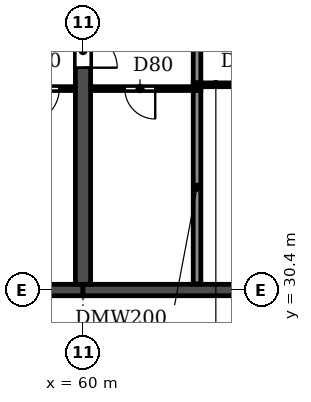
"""IFC4 building model, lengths in metres.
Left out: names, types, materials, properties, quantities, classifications, styles, units other than length and angle.
Written with IfcOpenShell. Run it as: python <this file> out.ifc"""

import sys

from ifc_helpers import new_model, si_unit, direction, frame, frame_2d, origin, place, context, subcontext, project, spatial, rectangle, extrude, element, fill, save


model = new_model("IFC4")
c1 = context("Model", 3, precision=1e-05, world=origin(), true_north=direction((0.0, 1.0)))
c2 = subcontext(c1, "Body", "Model", "MODEL_VIEW")
j1 = project(units=[si_unit("LENGTHUNIT", "METRE"), si_unit("PLANEANGLEUNIT", "RADIAN")], contexts=[c1])
p1 = place(None, origin())
s1 = spatial("IfcSite", under=j1, at=p1, CompositionType="ELEMENT")
p2 = place(p1, origin())
s2 = spatial("IfcBuilding", under=s1, at=p2, CompositionType="ELEMENT")
p3 = place(p2, frame((0.0, 0.0, 49.8)))
s3 = spatial("IfcBuildingStorey", under=s2, at=p3, CompositionType="ELEMENT", Elevation=49.8)
p4 = place(p3, frame((60.0, 30.55, 0.0), z_axis=(0.0, 0.0, 1.0), x_axis=(0.0, 1.0, 0.0)))
e1 = element("IfcWall", 1, at=p4, inside=s3, PredefinedType="SHEAR", context=c2, shape_type="SweptSolid", body=[
    extrude(rectangle(XDim=14.05, YDim=0.4, at=frame_2d((7.025, 0.0))), origin(), (0.0, 0.0, 1.0), 3.0),
])
p5 = place(p4, frame((5.7, 0.0, 0.0)))
e2 = element("IfcOpeningElement", 2, at=p5, cuts=e1, PredefinedType="OPENING", context=c2, shape_type="SweptSolid", body=[
    extrude(rectangle(XDim=0.9, YDim=2.1, at=frame_2d((0.45, 1.05))), frame((0.0, 0.21, 0.0), z_axis=(0.0, -1.0, 0.0), x_axis=(1.0, 0.0, 0.0)), (0.0, 0.0, 1.0), 0.42),
])
p6 = place(p3, frame((54.0, 30.4, 0.0), z_axis=(0.0, 0.0, 1.0), x_axis=(1.0, 0.0, 0.0)))
e3 = element("IfcWall", 3, at=p6, inside=s3, PredefinedType="SHEAR", context=c2, shape_type="SweptSolid", body=[
    extrude(rectangle(XDim=6.0, YDim=0.3, at=frame_2d((3.0, 0.0))), origin(), (0.0, 0.0, 1.0), 2.4),
])
p7 = place(p6, frame((2.45, 0.0, 0.0)))
e4 = element("IfcOpeningElement", 4, at=p7, cuts=e3, PredefinedType="OPENING", context=c2, shape_type="SweptSolid", body=[
    extrude(rectangle(XDim=1.0, YDim=2.1, at=frame_2d((0.5, 1.05))), frame((0.0, 0.16, 0.0), z_axis=(0.0, -1.0, 0.0), x_axis=(1.0, 0.0, 0.0)), (0.0, 0.0, 1.0), 0.32),
])
p8 = place(p3, frame((60.0, 30.4, 0.0), z_axis=(0.0, 0.0, 1.0), x_axis=(1.0, 0.0, 0.0)))
e5 = element("IfcWall", 5, at=p8, inside=s3, PredefinedType="SHEAR", context=c2, shape_type="SweptSolid", body=[
    extrude(rectangle(XDim=6.0, YDim=0.3, at=frame_2d((3.0, 0.0))), origin(), (0.0, 0.0, 1.0), 2.4),
])
p9 = place(p3, frame((63.0, 30.56, 0.0), z_axis=(0.0, 0.0, 1.0), x_axis=(0.0, 1.0, 0.0)))
e6 = element("IfcWall", 6, at=p9, inside=s3, PredefinedType="PARTITIONING", context=c2, shape_type="SweptSolid", body=[
    extrude(rectangle(XDim=5.09, YDim=0.2, at=frame_2d((2.545, 0.0))), origin(), (0.0, 0.0, 1.0), 3.0),
])
p10 = place(p3, frame((63.0, 35.85, 0.0), z_axis=(0.0, 0.0, 1.0), x_axis=(0.0, 1.0, 0.0)))
e7 = element("IfcWall", 7, at=p10, inside=s3, PredefinedType="PARTITIONING", context=c2, shape_type="SweptSolid", body=[
    extrude(rectangle(XDim=8.89, YDim=0.2, at=frame_2d((4.445, 0.0))), origin(), (0.0, 0.0, 1.0), 3.0),
])
p11 = place(p3, frame((57.8, 35.7, 0.0), z_axis=(0.0, 0.0, 1.0), x_axis=(1.0, 0.0, 0.0)))
e8 = element("IfcWall", 8, at=p11, inside=s3, PredefinedType="PARTITIONING", context=c2, shape_type="SweptSolid", body=[
    extrude(rectangle(XDim=1.99, YDim=0.1, at=frame_2d((0.995, 0.0))), origin(), (0.0, 0.0, 1.0), 3.0),
])
p12 = place(p11, frame((0.675, 0.0, 0.0)))
e9 = element("IfcOpeningElement", 9, at=p12, cuts=e8, PredefinedType="OPENING", context=c2, shape_type="SweptSolid", body=[
    extrude(rectangle(XDim=0.9, YDim=2.1, at=frame_2d((0.45, 1.05))), frame((0.0, 0.06, 0.0), z_axis=(0.0, -1.0, 0.0), x_axis=(1.0, 0.0, 0.0)), (0.0, 0.0, 1.0), 0.12),
])
p13 = place(p3, frame((60.21, 35.7, 0.0), z_axis=(0.0, 0.0, 1.0), x_axis=(1.0, 0.0, 0.0)))
e10 = element("IfcWall", 10, at=p13, inside=s3, PredefinedType="PARTITIONING", context=c2, shape_type="SweptSolid", body=[
    extrude(rectangle(XDim=2.89, YDim=0.1, at=frame_2d((1.445, 0.0))), origin(), (0.0, 0.0, 1.0), 3.0),
])
p14 = place(p13, frame((0.89, 0.0, 0.0)))
e11 = element("IfcOpeningElement", 11, at=p14, cuts=e10, PredefinedType="OPENING", context=c2, shape_type="SweptSolid", body=[
    extrude(rectangle(XDim=0.8, YDim=2.1, at=frame_2d((0.4, 1.05))), frame((0.0, 0.06, 0.0), z_axis=(0.0, -1.0, 0.0), x_axis=(1.0, 0.0, 0.0)), (0.0, 0.0, 1.0), 0.12),
])
p15 = place(p3, frame((62.9, 35.8, 0.0), z_axis=(0.0, 0.0, 1.0), x_axis=(1.0, 0.0, 0.0)))
e12 = element("IfcWall", 12, at=p15, inside=s3, PredefinedType="PARTITIONING", context=c2, shape_type="SweptSolid", body=[
    extrude(rectangle(XDim=2.89, YDim=0.1, at=frame_2d((1.445, 0.0))), origin(), (0.0, 0.0, 1.0), 3.0),
])
p16 = place(p15, frame((1.2, 0.0, 0.0)))
e13 = element("IfcOpeningElement", 13, at=p16, cuts=e12, PredefinedType="OPENING", context=c2, shape_type="SweptSolid", body=[
    extrude(rectangle(XDim=0.8, YDim=2.1, at=frame_2d((0.4, 1.05))), frame((0.0, 0.06, 0.0), z_axis=(0.0, -1.0, 0.0), x_axis=(1.0, 0.0, 0.0)), (0.0, 0.0, 1.0), 0.12),
])
p17 = place(p14, frame((0.8, 0.0, 0.0), z_axis=(0.0, 0.0, 1.0), x_axis=(-1.0, 0.0, 0.0)))
e14 = element("IfcDoor", 14, at=p17, inside=s3, OperationType="SINGLE_SWING_LEFT", PredefinedType="DOOR", context=c2, shape_type="SweptSolid", body=[
    extrude(rectangle(XDim=0.8, YDim=2.1, at=frame_2d((0.4, 1.05))), frame((0.0, 0.025, 0.0), z_axis=(0.0, -1.0, 0.0), x_axis=(1.0, 0.0, 0.0)), (0.0, 0.0, 1.0), 0.05),
])
fill(e11, e14)
p18 = place(p12, frame((0.9, 0.0, 0.0), z_axis=(0.0, 0.0, 1.0), x_axis=(-1.0, 0.0, 0.0)))
e15 = element("IfcDoor", 15, at=p18, inside=s3, OperationType="SINGLE_SWING_RIGHT", PredefinedType="DOOR", context=c2, shape_type="SweptSolid", body=[
    extrude(rectangle(XDim=0.9, YDim=2.1, at=frame_2d((0.45, 1.05))), frame((0.0, 0.025, 0.0), z_axis=(0.0, -1.0, 0.0), x_axis=(1.0, 0.0, 0.0)), (0.0, 0.0, 1.0), 0.05),
])
fill(e9, e15)
p19 = place(p5, frame((0.9, 0.0, 0.0), z_axis=(0.0, 0.0, 1.0), x_axis=(-1.0, 0.0, 0.0)))
e16 = element("IfcDoor", 16, at=p19, inside=s3, OperationType="SINGLE_SWING_RIGHT", PredefinedType="DOOR", context=c2, shape_type="SweptSolid", body=[
    extrude(rectangle(XDim=0.9, YDim=2.1, at=frame_2d((0.45, 1.05))), frame((0.0, 0.025, 0.0), z_axis=(0.0, -1.0, 0.0), x_axis=(1.0, 0.0, 0.0)), (0.0, 0.0, 1.0), 0.05),
])
fill(e2, e16)
save(model, sys.argv[1])
